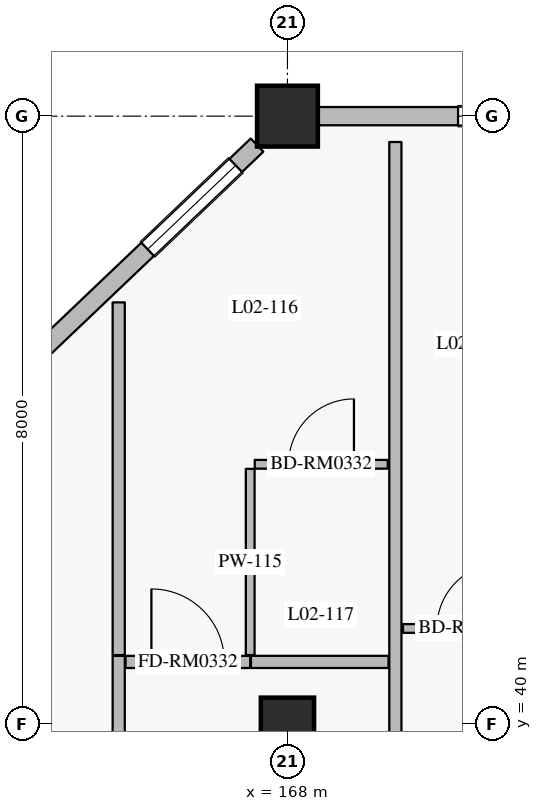
"""IFC4 building model, lengths in metres.
Left out: names, types, materials, properties, quantities, classifications, styles, units other than length and angle.
Written with IfcOpenShell. Run it as: python <this file> out.ifc"""

import sys

from ifc_helpers import new_model, si_unit, direction, frame, frame_2d, origin, origin_2d, place, context, subcontext, project, spatial, rectangle, extrude, element, fill, save


model = new_model("IFC4")
c1 = context("Model", 3, precision=1e-05, world=origin(), true_north=direction((0.0, 1.0)))
c2 = subcontext(c1, "Body", "Model", "MODEL_VIEW")
j1 = project(units=[si_unit("LENGTHUNIT", "METRE"), si_unit("PLANEANGLEUNIT", "RADIAN")], contexts=[c1])
p1 = place(None, origin())
s1 = spatial("IfcSite", under=j1, at=p1, CompositionType="ELEMENT")
p2 = place(p1, origin())
s2 = spatial("IfcBuilding", under=s1, at=p2, CompositionType="ELEMENT")
p3 = place(p2, frame((0.0, 0.0, 11.4)))
s3 = spatial("IfcBuildingStorey", under=s2, at=p3, CompositionType="ELEMENT", Elevation=11.4)
p4 = place(p3, frame((168.0, 48.0, 0.0), z_axis=(0.0, 0.0, 1.0), x_axis=(1.0, 0.0, 0.0)))
e1 = element("IfcColumn", 1, at=p4, inside=s3, PredefinedType="COLUMN", context=c2, shape_type="SweptSolid", body=[
    extrude(rectangle(XDim=0.8, YDim=0.8, at=origin_2d()), origin(), (0.0, 0.0, 1.0), 4.8),
])
p5 = place(p3, frame((168.0, 40.0, 0.0), z_axis=(0.0, 0.0, 1.0), x_axis=(1.0, 0.0, 0.0)))
e2 = element("IfcColumn", 2, at=p5, inside=s3, PredefinedType="COLUMN", context=c2, shape_type="SweptSolid", body=[
    extrude(rectangle(XDim=0.7, YDim=0.7, at=origin_2d()), origin(), (0.0, 0.0, 1.0), 4.8),
])
p6 = place(p3, frame((160.0, 40.381, 0.0), z_axis=(0.0, 0.0, 1.0), x_axis=(0.724156739794, 0.689635422677, 0.0)))
e3 = element("IfcWall", 3, at=p6, inside=s3, PredefinedType="SOLIDWALL", context=c2, shape_type="SweptSolid", body=[
    extrude(rectangle(XDim=10.495, YDim=0.24, at=frame_2d((5.248, 0.0))), origin(), (0.0, 0.0, 1.0), 4.13),
])
p7 = place(p6, frame((0.602, 0.0, 0.8)))
e4 = element("IfcOpeningElement", 4, at=p7, cuts=e3, PredefinedType="OPENING", context=c2, shape_type="SweptSolid", body=[
    extrude(rectangle(XDim=1.6, YDim=1.6, at=frame_2d((0.8, 0.8))), frame((0.0, 0.13, 0.0), z_axis=(0.0, -1.0, 0.0), x_axis=(1.0, 0.0, 0.0)), (0.0, 0.0, 1.0), 0.26),
])
p8 = place(p6, frame((4.662, 0.0, 0.8)))
e5 = element("IfcOpeningElement", 5, at=p8, cuts=e3, PredefinedType="OPENING", context=c2, shape_type="SweptSolid", body=[
    extrude(rectangle(XDim=1.6, YDim=1.6, at=frame_2d((0.8, 0.8))), frame((0.0, 0.13, 0.0), z_axis=(0.0, -1.0, 0.0), x_axis=(1.0, 0.0, 0.0)), (0.0, 0.0, 1.0), 0.26),
])
p9 = place(p6, frame((8.508, 0.0, 0.8)))
e6 = element("IfcOpeningElement", 6, at=p9, cuts=e3, PredefinedType="OPENING", context=c2, shape_type="SweptSolid", body=[
    extrude(rectangle(XDim=1.6, YDim=1.6, at=frame_2d((0.8, 0.8))), frame((0.0, 0.13, 0.0), z_axis=(0.0, -1.0, 0.0), x_axis=(1.0, 0.0, 0.0)), (0.0, 0.0, 1.0), 0.26),
])
p10 = place(p3, frame((168.4, 48.0, 0.0), z_axis=(0.0, 0.0, 1.0), x_axis=(1.0, 0.0, 0.0)))
e7 = element("IfcWall", 7, at=p10, inside=s3, PredefinedType="SOLIDWALL", context=c2, shape_type="SweptSolid", body=[
    extrude(rectangle(XDim=7.6, YDim=0.24, at=frame_2d((3.8, 0.0))), origin(), (0.0, 0.0, 1.0), 4.13),
])
p11 = place(p10, frame((1.845, 0.0, 0.8)))
e8 = element("IfcOpeningElement", 8, at=p11, cuts=e7, PredefinedType="OPENING", context=c2, shape_type="SweptSolid", body=[
    extrude(rectangle(XDim=2.0, YDim=1.75, at=frame_2d((1.0, 0.875))), frame((0.0, 0.13, 0.0), z_axis=(0.0, -1.0, 0.0), x_axis=(1.0, 0.0, 0.0)), (0.0, 0.0, 1.0), 0.26),
])
p12 = place(p10, frame((5.185, 0.0, 0.8)))
e9 = element("IfcOpeningElement", 9, at=p12, cuts=e7, PredefinedType="OPENING", context=c2, shape_type="SweptSolid", body=[
    extrude(rectangle(XDim=2.0, YDim=1.75, at=frame_2d((1.0, 0.875))), frame((0.0, 0.13, 0.0), z_axis=(0.0, -1.0, 0.0), x_axis=(1.0, 0.0, 0.0)), (0.0, 0.0, 1.0), 0.26),
])
p13 = place(p3, frame((165.78, 32.26, 0.0), z_axis=(0.0, 0.0, 1.0), x_axis=(0.0, 1.0, 0.0)))
e10 = element("IfcWall", 10, at=p13, inside=s3, PredefinedType="PARTITIONING", context=c2, shape_type="SweptSolid", body=[
    extrude(rectangle(XDim=8.64, YDim=0.16, at=frame_2d((4.32, 0.0))), origin(), (0.0, 0.0, 1.0), 4.535),
])
p14 = place(p3, frame((165.87, 40.82, 0.0), z_axis=(0.0, 0.0, 1.0), x_axis=(1.0, 0.0, 0.0)))
e11 = element("IfcWall", 11, at=p14, inside=s3, PredefinedType="PARTITIONING", context=c2, shape_type="SweptSolid", body=[
    extrude(rectangle(XDim=1.64, YDim=0.16, at=frame_2d((0.82, 0.0))), origin(), (0.0, 0.0, 1.0), 4.535),
])
p15 = place(p14, frame((0.34, 0.0, 0.0)))
e12 = element("IfcOpeningElement", 12, at=p15, cuts=e11, PredefinedType="OPENING", context=c2, shape_type="SweptSolid", body=[
    extrude(rectangle(XDim=0.96, YDim=2.2, at=frame_2d((0.48, 1.1))), frame((0.0, 0.09, 0.0), z_axis=(0.0, -1.0, 0.0), x_axis=(1.0, 0.0, 0.0)), (0.0, 0.0, 1.0), 0.18),
])
p16 = place(p3, frame((167.52, 40.82, 0.0), z_axis=(0.0, 0.0, 1.0), x_axis=(1.0, 0.0, 0.0)))
e13 = element("IfcWall", 13, at=p16, inside=s3, PredefinedType="PARTITIONING", context=c2, shape_type="SweptSolid", body=[
    extrude(rectangle(XDim=1.81, YDim=0.16, at=frame_2d((0.905, 0.0))), origin(), (0.0, 0.0, 1.0), 4.535),
])
p17 = place(p3, frame((167.51, 40.91, 0.0), z_axis=(0.0, 0.0, 1.0), x_axis=(0.0, 1.0, 0.0)))
e14 = element("IfcWall", 14, at=p17, inside=s3, PredefinedType="PARTITIONING", context=c2, shape_type="SweptSolid", body=[
    extrude(rectangle(XDim=2.45, YDim=0.115, at=frame_2d((1.225, 0.0))), origin(), (0.0, 0.0, 1.0), 4.535),
])
p18 = place(p3, frame((167.57, 43.42, 0.0), z_axis=(0.0, 0.0, 1.0), x_axis=(1.0, 0.0, 0.0)))
e15 = element("IfcWall", 15, at=p18, inside=s3, PredefinedType="PARTITIONING", context=c2, shape_type="SweptSolid", body=[
    extrude(rectangle(XDim=1.75, YDim=0.115, at=frame_2d((0.875, 0.0))), origin(), (0.0, 0.0, 1.0), 4.535),
])
p19 = place(p18, frame((0.445, 0.0, 0.0)))
e16 = element("IfcOpeningElement", 16, at=p19, cuts=e15, PredefinedType="OPENING", context=c2, shape_type="SweptSolid", body=[
    extrude(rectangle(XDim=0.86, YDim=2.12, at=frame_2d((0.43, 1.06))), frame((0.0, 0.067, 0.0), z_axis=(0.0, -1.0, 0.0), x_axis=(1.0, 0.0, 0.0)), (0.0, 0.0, 1.0), 0.135),
])
p20 = place(p3, frame((165.78, 40.91, 0.0), z_axis=(0.0, 0.0, 1.0), x_axis=(0.0, 1.0, 0.0)))
e17 = element("IfcWall", 17, at=p20, inside=s3, PredefinedType="PARTITIONING", context=c2, shape_type="SweptSolid", body=[
    extrude(rectangle(XDim=4.64, YDim=0.16, at=frame_2d((2.32, 0.0))), origin(), (0.0, 0.0, 1.0), 4.535),
])
p21 = place(p3, frame((169.52, 41.26, 0.0), z_axis=(0.0, 0.0, 1.0), x_axis=(1.0, 0.0, 0.0)))
e18 = element("IfcWall", 18, at=p21, inside=s3, PredefinedType="PARTITIONING", context=c2, shape_type="SweptSolid", body=[
    extrude(rectangle(XDim=1.75, YDim=0.115, at=frame_2d((0.875, 0.0))), origin(), (0.0, 0.0, 1.0), 4.535),
])
p22 = place(p21, frame((0.445, 0.0, 0.0)))
e19 = element("IfcOpeningElement", 19, at=p22, cuts=e18, PredefinedType="OPENING", context=c2, shape_type="SweptSolid", body=[
    extrude(rectangle(XDim=0.86, YDim=2.12, at=frame_2d((0.43, 1.06))), frame((0.0, 0.067, 0.0), z_axis=(0.0, -1.0, 0.0), x_axis=(1.0, 0.0, 0.0)), (0.0, 0.0, 1.0), 0.135),
])
p23 = place(p3, frame((169.42, 38.75, 0.0), z_axis=(0.0, 0.0, 1.0), x_axis=(0.0, 1.0, 0.0)))
e20 = element("IfcWall", 20, at=p23, inside=s3, PredefinedType="PARTITIONING", context=c2, shape_type="SweptSolid", body=[
    extrude(rectangle(XDim=8.91, YDim=0.16, at=frame_2d((4.455, 0.0))), origin(), (0.0, 0.0, 1.0), 4.535),
])
p24 = place(p9, origin())
e21 = element("IfcWindow", 21, at=p24, inside=s3, PartitioningType="SINGLE_PANEL", PredefinedType="WINDOW", context=c2, shape_type="SweptSolid", body=[
    extrude(rectangle(XDim=1.6, YDim=1.6, at=frame_2d((0.8, 0.8))), frame((0.0, 0.03, 0.0), z_axis=(0.0, -1.0, 0.0), x_axis=(1.0, 0.0, 0.0)), (0.0, 0.0, 1.0), 0.06),
])
fill(e6, e21)
p25 = place(p11, origin())
e22 = element("IfcWindow", 22, at=p25, inside=s3, PartitioningType="DOUBLE_PANEL_VERTICAL", PredefinedType="WINDOW", context=c2, shape_type="SweptSolid", body=[
    extrude(rectangle(XDim=2.0, YDim=1.75, at=frame_2d((1.0, 0.875))), frame((0.0, 0.03, 0.0), z_axis=(0.0, -1.0, 0.0), x_axis=(1.0, 0.0, 0.0)), (0.0, 0.0, 1.0), 0.06),
])
fill(e8, e22)
p26 = place(p15, origin())
e23 = element("IfcDoor", 23, at=p26, inside=s3, OperationType="SINGLE_SWING_LEFT", PredefinedType="DOOR", context=c2, shape_type="SweptSolid", body=[
    extrude(rectangle(XDim=0.96, YDim=2.2, at=frame_2d((0.48, 1.1))), frame((0.0, 0.025, 0.0), z_axis=(0.0, -1.0, 0.0), x_axis=(1.0, 0.0, 0.0)), (0.0, 0.0, 1.0), 0.05),
])
fill(e12, e23)
p27 = place(p19, origin())
e24 = element("IfcDoor", 24, at=p27, inside=s3, OperationType="SINGLE_SWING_RIGHT", PredefinedType="DOOR", context=c2, shape_type="SweptSolid", body=[
    extrude(rectangle(XDim=0.86, YDim=2.12, at=frame_2d((0.43, 1.06))), frame((0.0, 0.025, 0.0), z_axis=(0.0, -1.0, 0.0), x_axis=(1.0, 0.0, 0.0)), (0.0, 0.0, 1.0), 0.05),
])
fill(e16, e24)
p28 = place(p22, origin())
e25 = element("IfcDoor", 25, at=p28, inside=s3, OperationType="SINGLE_SWING_RIGHT", PredefinedType="DOOR", context=c2, shape_type="SweptSolid", body=[
    extrude(rectangle(XDim=0.86, YDim=2.12, at=frame_2d((0.43, 1.06))), frame((0.0, 0.025, 0.0), z_axis=(0.0, -1.0, 0.0), x_axis=(1.0, 0.0, 0.0)), (0.0, 0.0, 1.0), 0.05),
])
fill(e19, e25)
save(model, sys.argv[1])
